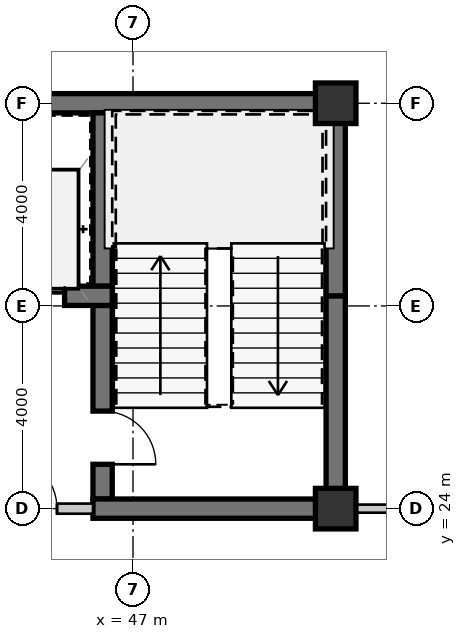
"""IFC4 building model, lengths in metres.
Left out: names, types, materials, properties, quantities, classifications, styles, units other than length and angle.
Written with IfcOpenShell. Run it as: python <this file> out.ifc"""

import sys

from ifc_helpers import new_model, si_unit, direction, frame, frame_2d, origin, origin_2d, place, context, subcontext, project, spatial, rectangle, extrude, source, transform, mapped, element, fill, save


model = new_model("IFC4")
c1 = context("Model", 3, precision=1e-05, world=origin(), true_north=direction((0.0, 1.0)))
c2 = subcontext(c1, "Body", "Model", "MODEL_VIEW")
j1 = project(units=[si_unit("LENGTHUNIT", "METRE"), si_unit("PLANEANGLEUNIT", "RADIAN")], contexts=[c1])
p1 = place(None, origin())
s1 = spatial("IfcSite", under=j1, at=p1, CompositionType="ELEMENT")
p2 = place(p1, origin())
s2 = spatial("IfcBuilding", under=s1, at=p2, CompositionType="ELEMENT")
p3 = place(p2, frame((0.0, 0.0, 32.55)))
s3 = spatial("IfcBuildingStorey", under=s2, at=p3, CompositionType="ELEMENT", Elevation=32.55)
m1 = source(origin(), c2, "Body", "SweptSolid", [
    extrude(rectangle(XDim=0.8, YDim=0.8, at=origin_2d()), origin(), (0.0, 0.0, 1.0), 3.15),
])
for number, where, z_axis, x_axis in (
    (1, (51.0, 24.0, 0.0), (0.0, 0.0, 1.0), (1.0, 0.0, 0.0)),
    (2, (51.0, 32.0, 0.0), (0.0, 0.0, 1.0), (1.0, 0.0, 0.0)),
):
    element("IfcColumn", number, at=place(p3, frame(where, z_axis=z_axis, x_axis=x_axis)), inside=s3, PredefinedType="COLUMN", context=c2, shape_type="MappedRepresentation", body=[
        mapped(m1, transform((0.0, 0.0, 0.0), scale=1.0)),
    ])
m2 = source(origin(), c2, "Body", "SweptSolid", [
    extrude(rectangle(XDim=11.99, YDim=0.38, at=frame_2d((5.995, 0.0))), origin(), (0.0, 0.0, 1.0), 2.93),
])
p4 = place(p3, frame((39.2, 32.0, 0.0), z_axis=(0.0, 0.0, 1.0), x_axis=(1.0, 0.0, 0.0)))
e3 = element("IfcWall", 3, at=p4, inside=s3, PredefinedType="SHEAR", context=c2, shape_type="MappedRepresentation", body=[
    mapped(m2, transform((0.0, 0.0, 0.0), scale=1.0)),
])
m3 = source(origin(), c2, "Body", "SweptSolid", [
    extrude(rectangle(XDim=4.01, YDim=0.38, at=frame_2d((2.005, 0.0))), origin(), (0.0, 0.0, 1.0), 2.93),
])
p5 = place(p3, frame((51.0, 24.19, 0.0), z_axis=(0.0, 0.0, 1.0), x_axis=(0.0, 1.0, 0.0)))
e4 = element("IfcWall", 4, at=p5, inside=s3, PredefinedType="SHEAR", context=c2, shape_type="MappedRepresentation", body=[
    mapped(m3, transform((0.0, 0.0, 0.0), scale=1.0)),
])
m4 = source(origin(), c2, "Body", "SweptSolid", [
    extrude(rectangle(XDim=3.61, YDim=0.38, at=frame_2d((1.805, 0.0))), origin(), (0.0, 0.0, 1.0), 2.93),
])
p6 = place(p3, frame((51.0, 28.2, 0.0), z_axis=(0.0, 0.0, 1.0), x_axis=(0.0, 1.0, 0.0)))
e5 = element("IfcWall", 5, at=p6, inside=s3, PredefinedType="SHEAR", context=c2, shape_type="MappedRepresentation", body=[
    mapped(m4, transform((0.0, 0.0, 0.0), scale=1.0)),
])
m5 = source(origin(), c2, "Body", "SweptSolid", [
    extrude(rectangle(XDim=3.42, YDim=0.38, at=frame_2d((1.71, 0.0))), origin(), (0.0, 0.0, 1.0), 2.93),
])
p7 = place(p3, frame((46.4, 31.81, 0.0), z_axis=(0.0, 0.0, 1.0), x_axis=(0.0, -1.0, 0.0)))
e6 = element("IfcWall", 6, at=p7, inside=s3, PredefinedType="SHEAR", context=c2, shape_type="MappedRepresentation", body=[
    mapped(m5, transform((0.0, 0.0, 0.0), scale=1.0)),
])
m6 = source(origin(), c2, "Body", "SweptSolid", [
    extrude(rectangle(XDim=3.82, YDim=0.38, at=frame_2d((1.91, 0.0))), origin(), (0.0, 0.0, 1.0), 2.93),
])
p8 = place(p3, frame((46.4, 28.01, 0.0), z_axis=(0.0, 0.0, 1.0), x_axis=(0.0, -1.0, 0.0)))
e7 = element("IfcWall", 7, at=p8, inside=s3, PredefinedType="SHEAR", context=c2, shape_type="MappedRepresentation", body=[
    mapped(m6, transform((0.0, 0.0, 0.0), scale=1.0)),
])
m7 = source(origin(), c2, "Body", "SweptSolid", [
    extrude(rectangle(XDim=1.05, YDim=2.1, at=frame_2d((0.525, 1.05))), frame((0.0, 0.2, 0.0), z_axis=(0.0, -1.0, 0.0), x_axis=(1.0, 0.0, 0.0)), (0.0, 0.0, 1.0), 0.4),
])
p9 = place(p8, frame((2.085, 0.0, 0.0)))
e8 = element("IfcOpeningElement", 8, at=p9, cuts=e7, PredefinedType="OPENING", context=c2, shape_type="MappedRepresentation", body=[
    mapped(m7, transform((0.0, 0.0, 0.0), scale=1.0)),
])
m8 = source(origin(), c2, "Body", "SweptSolid", [
    extrude(rectangle(XDim=4.98, YDim=0.38, at=frame_2d((2.49, 0.0))), origin(), (0.0, 0.0, 1.0), 2.93),
])
p10 = place(p3, frame((46.21, 24.0, 0.0), z_axis=(0.0, 0.0, 1.0), x_axis=(1.0, 0.0, 0.0)))
e9 = element("IfcWall", 9, at=p10, inside=s3, PredefinedType="SHEAR", context=c2, shape_type="MappedRepresentation", body=[
    mapped(m8, transform((0.0, 0.0, 0.0), scale=1.0)),
])
m9 = source(origin(), c2, "Body", "SweptSolid", [
    extrude(rectangle(XDim=2.98, YDim=0.38, at=frame_2d((1.49, 0.0))), origin(), (0.0, 0.0, 1.0), 2.93),
])
p11 = place(p3, frame((43.61, 28.2, 0.0), z_axis=(0.0, 0.0, 1.0), x_axis=(1.0, 0.0, 0.0)))
e10 = element("IfcWall", 10, at=p11, inside=s3, PredefinedType="SHEAR", context=c2, shape_type="MappedRepresentation", body=[
    mapped(m9, transform((0.0, 0.0, 0.0), scale=1.0)),
])
m10 = source(origin(), c2, "Body", "SweptSolid", [
    extrude(rectangle(XDim=1.1, YDim=2.15, at=frame_2d((0.55, 1.075))), frame((0.0, 0.2, 0.0), z_axis=(0.0, -1.0, 0.0), x_axis=(1.0, 0.0, 0.0)), (0.0, 0.0, 1.0), 0.4),
])
p12 = place(p11, frame((0.94, 0.0, 0.0)))
e11 = element("IfcOpeningElement", 11, at=p12, cuts=e10, PredefinedType="OPENING", context=c2, shape_type="MappedRepresentation", body=[
    mapped(m10, transform((0.0, 0.0, 0.0), scale=1.0)),
])
m11 = source(origin(), c2, "Body", "SweptSolid", [
    extrude(rectangle(XDim=2.66, YDim=0.2, at=frame_2d((1.33, 0.0))), origin(), (0.0, 0.0, 1.0), 2.397),
])
p13 = place(p3, frame((43.55, 24.0, 0.0), z_axis=(0.0, 0.0, 1.0), x_axis=(1.0, 0.0, 0.0)))
e12 = element("IfcWall", 12, at=p13, inside=s3, PredefinedType="SOLIDWALL", context=c2, shape_type="MappedRepresentation", body=[
    mapped(m11, transform((0.0, 0.0, 0.0), scale=1.0)),
])
m12 = source(origin(), c2, "Body", "SweptSolid", [
    extrude(rectangle(XDim=1.05, YDim=2.1, at=frame_2d((0.525, 1.05))), frame((0.0, 0.11, 0.0), z_axis=(0.0, -1.0, 0.0), x_axis=(1.0, 0.0, 0.0)), (0.0, 0.0, 1.0), 0.22),
])
p14 = place(p13, frame((0.9, 0.0, 0.0)))
e13 = element("IfcOpeningElement", 13, at=p14, cuts=e12, PredefinedType="OPENING", context=c2, shape_type="MappedRepresentation", body=[
    mapped(m12, transform((0.0, 0.0, 0.0), scale=1.0)),
])
m13 = source(origin(), c2, "Body", "SweptSolid", [
    extrude(rectangle(XDim=4.13, YDim=0.16, at=frame_2d((2.065, 0.0))), origin(), (0.0, 0.0, 1.0), 2.93),
])
p15 = place(p3, frame((51.19, 24.0, 0.0), z_axis=(0.0, 0.0, 1.0), x_axis=(1.0, 0.0, 0.0)))
e14 = element("IfcWall", 14, at=p15, inside=s3, PredefinedType="PARTITIONING", context=c2, shape_type="MappedRepresentation", body=[
    mapped(m13, transform((0.0, 0.0, 0.0), scale=1.0)),
])
m14 = source(origin(), c2, "Body", "SweptSolid", [
    extrude(rectangle(XDim=1.05, YDim=2.1, at=frame_2d((0.525, 1.05))), frame((0.0, 0.025, 0.0), z_axis=(0.0, -1.0, 0.0), x_axis=(1.0, 0.0, 0.0)), (0.0, 0.0, 1.0), 0.05),
])
p16 = place(p9, origin())
e15 = element("IfcDoor", 15, at=p16, inside=s3, OperationType="SINGLE_SWING_RIGHT", PredefinedType="DOOR", context=c2, shape_type="MappedRepresentation", body=[
    mapped(m14, transform((0.0, 0.0, 0.0), scale=1.0)),
])
fill(e8, e15)
m15 = source(origin(), c2, "Body", "SweptSolid", [
    extrude(rectangle(XDim=1.1, YDim=2.15, at=frame_2d((0.55, 1.075))), frame((0.0, 0.025, 0.0), z_axis=(0.0, -1.0, 0.0), x_axis=(1.0, 0.0, 0.0)), (0.0, 0.0, 1.0), 0.05),
])
p17 = place(p12, origin())
e16 = element("IfcDoor", 16, at=p17, inside=s3, OperationType="SLIDING_TO_LEFT", PredefinedType="DOOR", context=c2, shape_type="MappedRepresentation", body=[
    mapped(m15, transform((0.0, 0.0, 0.0), scale=1.0)),
])
fill(e11, e16)
p18 = place(p14, origin())
e17 = element("IfcDoor", 17, at=p18, inside=s3, OperationType="SINGLE_SWING_LEFT", PredefinedType="DOOR", context=c2, shape_type="MappedRepresentation", body=[
    mapped(m14, transform((0.0, 0.0, 0.0), scale=1.0)),
])
fill(e13, e17)
save(model, sys.argv[1])
